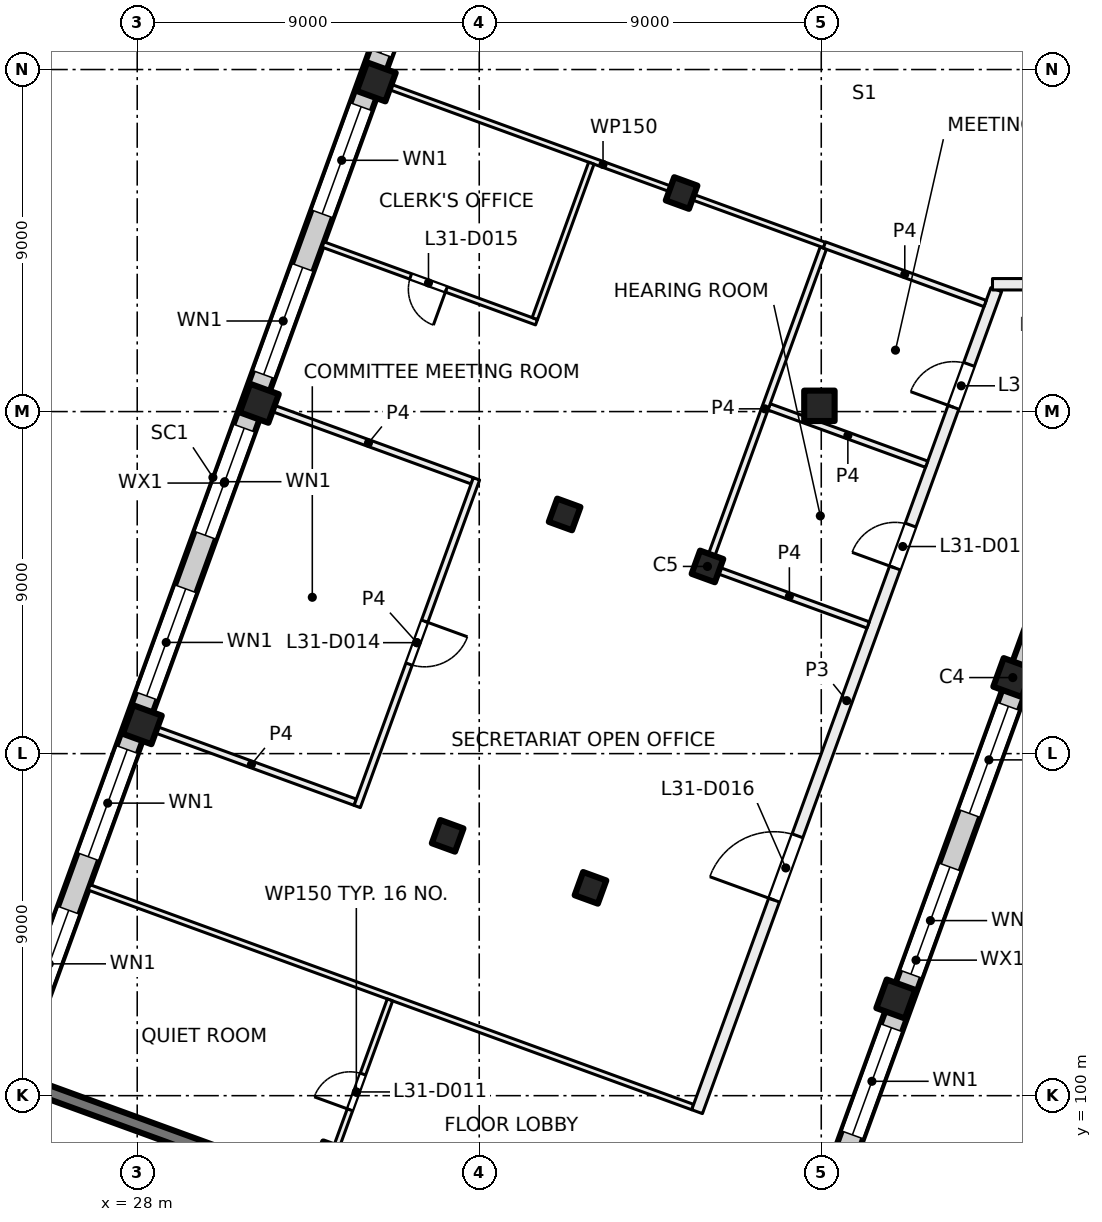
"""IFC4 building model, lengths in metres.
Left out: names, types, materials, properties, quantities, classifications, styles, units other than length and angle.
Written with IfcOpenShell. Run it as: python <this file> out.ifc"""

import sys

from ifc_helpers import new_model, si_unit, direction, frame, frame_2d, origin, origin_2d, place, context, subcontext, project, spatial, rectangle, extrude, element, fill, save


model = new_model("IFC4")
c1 = context("Model", 3, precision=1e-05, world=origin(), true_north=direction((0.0, 1.0)))
c2 = subcontext(c1, "Body", "Model", "MODEL_VIEW")
j1 = project(units=[si_unit("LENGTHUNIT", "METRE"), si_unit("PLANEANGLEUNIT", "RADIAN")], contexts=[c1])
p1 = place(None, origin())
s1 = spatial("IfcSite", under=j1, at=p1, CompositionType="ELEMENT")
p2 = place(p1, origin())
s2 = spatial("IfcBuilding", under=s1, at=p2, CompositionType="ELEMENT")
p3 = place(p2, frame((0.0, 0.0, 134.5)))
s3 = spatial("IfcBuildingStorey", under=s2, at=p3, CompositionType="ELEMENT", Elevation=134.5)
p4 = place(p3, frame((45.952, 118.152, 0.0), z_axis=(0.0, 0.0, 1.0), x_axis=(1.0, 0.0, 0.0)))
e1 = element("IfcColumn", 1, at=p4, inside=s3, PredefinedType="COLUMN", context=c2, shape_type="SweptSolid", body=[
    extrude(rectangle(XDim=0.8, YDim=0.8, at=origin_2d()), origin(), (0.0, 0.0, 1.0), 4.0),
])
for number, where, z_axis, x_axis in (
    (2, (43.006, 113.925, 0.0), (0.0, 0.0, 1.0), (-0.342, -0.94, 0.0)),
    (3, (39.927, 105.468, 0.0), (0.0, 0.0, 1.0), (-0.342, -0.94, 0.0)),
    (4, (42.325, 123.751, 0.0), (0.0, 0.0, 1.0), (-0.342, -0.94, 0.0)),
    (5, (39.247, 115.293, 0.0), (0.0, 0.0, 1.0), (-0.342, -0.94, 0.0)),
    (6, (36.169, 106.836, 0.0), (0.0, 0.0, 1.0), (-0.342, -0.94, 0.0)),
    (7, (33.091, 98.379, 0.0), (0.0, 0.0, 1.0), (-0.342, -0.94, 0.0)),
):
    element("IfcColumn", number, at=place(p3, frame(where, z_axis=z_axis, x_axis=x_axis)), inside=s3, PredefinedType="COLUMN", context=c2, shape_type="SweptSolid", body=[
        extrude(rectangle(XDim=0.65, YDim=0.65, at=origin_2d()), origin(), (0.0, 0.0, 1.0), 4.0),
    ])
for number, where, z_axis, x_axis in (
    (8, (51.04, 111.001, 0.0), (0.0, 0.0, 1.0), (-0.342, -0.94, 0.0)),
    (9, (47.962, 102.544, 0.0), (0.0, 0.0, 1.0), (-0.342, -0.94, 0.0)),
    (10, (34.291, 126.675, 0.0), (0.0, 0.0, 1.0), (-0.342, -0.94, 0.0)),
    (11, (31.212, 118.218, 0.0), (0.0, 0.0, 1.0), (-0.342, -0.94, 0.0)),
    (12, (28.134, 109.76, 0.0), (0.0, 0.0, 1.0), (-0.342, -0.94, 0.0)),
):
    element("IfcColumn", number, at=place(p3, frame(where, z_axis=z_axis, x_axis=x_axis)), inside=s3, PredefinedType="COLUMN", context=c2, shape_type="SweptSolid", body=[
        extrude(rectangle(XDim=0.8, YDim=0.8, at=origin_2d()), origin(), (0.0, 0.0, 1.0), 4.0),
    ])
p5 = place(p3, frame((32.962, 97.441, 0.0), z_axis=(0.0, 0.0, 1.0), x_axis=(-0.939689545667, 0.342028592028, 0.0)))
e13 = element("IfcWall", 13, at=p5, inside=s3, PredefinedType="SHEAR", context=c2, shape_type="SweptSolid", body=[
    extrude(rectangle(XDim=8.65, YDim=0.35, at=frame_2d((4.325, 0.0))), origin(), (0.0, 0.0, 1.0), 4.0),
])
p6 = place(p3, frame((52.212, 113.783, 0.0), z_axis=(0.0, 0.0, 1.0), x_axis=(-0.34202521188, -0.939690775968, 0.0)))
e14 = element("IfcWall", 14, at=p6, inside=s3, PredefinedType="SOLIDWALL", context=c2, shape_type="SweptSolid", body=[
    extrude(rectangle(XDim=21.745, YDim=0.6, at=frame_2d((10.873, 0.0))), origin(), (0.0, 0.0, 1.0), 3.625),
])
p7 = place(p6, frame((3.765, 0.0, 0.9)))
e15 = element("IfcOpeningElement", 15, at=p7, cuts=e14, PredefinedType="OPENING", context=c2, shape_type="SweptSolid", body=[
    extrude(rectangle(XDim=3.0, YDim=2.4, at=frame_2d((1.5, 1.2))), frame((0.0, 0.31, 0.0), z_axis=(0.0, -1.0, 0.0), x_axis=(1.0, 0.0, 0.0)), (0.0, 0.0, 1.0), 0.62),
])
p8 = place(p6, frame((8.265, 0.0, 0.9)))
e16 = element("IfcOpeningElement", 16, at=p8, cuts=e14, PredefinedType="OPENING", context=c2, shape_type="SweptSolid", body=[
    extrude(rectangle(XDim=3.0, YDim=2.4, at=frame_2d((1.5, 1.2))), frame((0.0, 0.31, 0.0), z_axis=(0.0, -1.0, 0.0), x_axis=(1.0, 0.0, 0.0)), (0.0, 0.0, 1.0), 0.62),
])
p9 = place(p6, frame((12.765, 0.0, 0.9)))
e17 = element("IfcOpeningElement", 17, at=p9, cuts=e14, PredefinedType="OPENING", context=c2, shape_type="SweptSolid", body=[
    extrude(rectangle(XDim=3.0, YDim=2.4, at=frame_2d((1.5, 1.2))), frame((0.0, 0.31, 0.0), z_axis=(0.0, -1.0, 0.0), x_axis=(1.0, 0.0, 0.0)), (0.0, 0.0, 1.0), 0.62),
])
p10 = place(p6, frame((17.265, 0.0, 0.9)))
e18 = element("IfcOpeningElement", 18, at=p10, cuts=e14, PredefinedType="OPENING", context=c2, shape_type="SweptSolid", body=[
    extrude(rectangle(XDim=3.0, YDim=2.4, at=frame_2d((1.5, 1.2))), frame((0.0, 0.31, 0.0), z_axis=(0.0, -1.0, 0.0), x_axis=(1.0, 0.0, 0.0)), (0.0, 0.0, 1.0), 0.62),
])
p11 = place(p3, frame((24.666, 100.669, 0.0), z_axis=(0.0, 0.0, 1.0), x_axis=(0.34201964167, 0.939692803373, 0.0)))
e19 = element("IfcWall", 19, at=p11, inside=s3, PredefinedType="SOLIDWALL", context=c2, shape_type="SweptSolid", body=[
    extrude(rectangle(XDim=32.884, YDim=0.6, at=frame_2d((16.442, 0.0))), origin(), (0.0, 0.0, 1.0), 3.625),
])
p12 = place(p11, frame((1.48, 0.0, 0.9)))
e20 = element("IfcOpeningElement", 20, at=p12, cuts=e19, PredefinedType="OPENING", context=c2, shape_type="SweptSolid", body=[
    extrude(rectangle(XDim=3.0, YDim=2.4, at=frame_2d((1.5, 1.2))), frame((0.0, 0.31, 0.0), z_axis=(0.0, -1.0, 0.0), x_axis=(1.0, 0.0, 0.0)), (0.0, 0.0, 1.0), 0.62),
])
p13 = place(p11, frame((5.98, 0.0, 0.9)))
e21 = element("IfcOpeningElement", 21, at=p13, cuts=e19, PredefinedType="OPENING", context=c2, shape_type="SweptSolid", body=[
    extrude(rectangle(XDim=3.0, YDim=2.4, at=frame_2d((1.5, 1.2))), frame((0.0, 0.31, 0.0), z_axis=(0.0, -1.0, 0.0), x_axis=(1.0, 0.0, 0.0)), (0.0, 0.0, 1.0), 0.62),
])
p14 = place(p11, frame((10.48, 0.0, 0.9)))
e22 = element("IfcOpeningElement", 22, at=p14, cuts=e19, PredefinedType="OPENING", context=c2, shape_type="SweptSolid", body=[
    extrude(rectangle(XDim=3.0, YDim=2.4, at=frame_2d((1.5, 1.2))), frame((0.0, 0.31, 0.0), z_axis=(0.0, -1.0, 0.0), x_axis=(1.0, 0.0, 0.0)), (0.0, 0.0, 1.0), 0.62),
])
p15 = place(p11, frame((14.98, 0.0, 0.9)))
e23 = element("IfcOpeningElement", 23, at=p15, cuts=e19, PredefinedType="OPENING", context=c2, shape_type="SweptSolid", body=[
    extrude(rectangle(XDim=3.0, YDim=2.4, at=frame_2d((1.5, 1.2))), frame((0.0, 0.31, 0.0), z_axis=(0.0, -1.0, 0.0), x_axis=(1.0, 0.0, 0.0)), (0.0, 0.0, 1.0), 0.62),
])
p16 = place(p11, frame((19.48, 0.0, 0.9)))
e24 = element("IfcOpeningElement", 24, at=p16, cuts=e19, PredefinedType="OPENING", context=c2, shape_type="SweptSolid", body=[
    extrude(rectangle(XDim=3.0, YDim=2.4, at=frame_2d((1.5, 1.2))), frame((0.0, 0.31, 0.0), z_axis=(0.0, -1.0, 0.0), x_axis=(1.0, 0.0, 0.0)), (0.0, 0.0, 1.0), 0.62),
])
p17 = place(p11, frame((23.98, 0.0, 0.9)))
e25 = element("IfcOpeningElement", 25, at=p17, cuts=e19, PredefinedType="OPENING", context=c2, shape_type="SweptSolid", body=[
    extrude(rectangle(XDim=3.0, YDim=2.4, at=frame_2d((1.5, 1.2))), frame((0.0, 0.31, 0.0), z_axis=(0.0, -1.0, 0.0), x_axis=(1.0, 0.0, 0.0)), (0.0, 0.0, 1.0), 0.62),
])
p18 = place(p11, frame((28.48, 0.0, 0.9)))
e26 = element("IfcOpeningElement", 26, at=p18, cuts=e19, PredefinedType="OPENING", context=c2, shape_type="SweptSolid", body=[
    extrude(rectangle(XDim=3.0, YDim=2.4, at=frame_2d((1.5, 1.2))), frame((0.0, 0.31, 0.0), z_axis=(0.0, -1.0, 0.0), x_axis=(1.0, 0.0, 0.0)), (0.0, 0.0, 1.0), 0.62),
])
p19 = place(p3, frame((26.736, 105.48, 0.0), z_axis=(0.0, 0.0, 1.0), x_axis=(0.939695108427, -0.342013308511, 0.0)))
e27 = element("IfcWall", 27, at=p19, inside=s3, PredefinedType="PARTITIONING", context=c2, shape_type="SweptSolid", body=[
    extrude(rectangle(XDim=16.9, YDim=0.15, at=frame_2d((8.45, 0.0))), origin(), (0.0, 0.0, 1.0), 3.625),
])
p20 = place(p3, frame((31.353, 118.166, 0.0), z_axis=(0.0, 0.0, 1.0), x_axis=(0.939708789041, -0.341975718143, 0.0)))
e28 = element("IfcWall", 28, at=p20, inside=s3, PredefinedType="PARTITIONING", context=c2, shape_type="SweptSolid", body=[
    extrude(rectangle(XDim=5.813, YDim=0.175, at=frame_2d((2.907, 0.0))), origin(), (0.0, 0.0, 1.0), 3.625),
])
p21 = place(p3, frame((33.737, 107.721, 0.0), z_axis=(0.0, 0.0, 1.0), x_axis=(-0.939694052357, 0.34201621009, 0.0)))
e29 = element("IfcWall", 29, at=p21, inside=s3, PredefinedType="PARTITIONING", context=c2, shape_type="SweptSolid", body=[
    extrude(rectangle(XDim=5.813, YDim=0.175, at=frame_2d((2.906, 0.0))), origin(), (0.0, 0.0, 1.0), 3.625),
])
p22 = place(p3, frame((34.431, 126.624, 0.0), z_axis=(0.0, 0.0, 1.0), x_axis=(0.939703144457, -0.341991228392, 0.0)))
e30 = element("IfcWall", 30, at=p22, inside=s3, PredefinedType="PARTITIONING", context=c2, shape_type="SweptSolid", body=[
    extrude(rectangle(XDim=12.401, YDim=0.15, at=frame_2d((6.2, 0.0))), origin(), (0.0, 0.0, 1.0), 3.625),
])
p23 = place(p3, frame((32.881, 97.657, 0.0), z_axis=(0.0, 0.0, 1.0), x_axis=(0.341981688871, 0.939706616172, 0.0)))
e31 = element("IfcWall", 31, at=p23, inside=s3, PredefinedType="PARTITIONING", context=c2, shape_type="SweptSolid", body=[
    extrude(rectangle(XDim=5.175, YDim=0.15, at=frame_2d((2.587, 0.0))), origin(), (0.0, 0.0, 1.0), 3.625),
])
p24 = place(p23, frame((2.098, 0.0, 0.0)))
e32 = element("IfcOpeningElement", 32, at=p24, cuts=e31, PredefinedType="OPENING", context=c2, shape_type="SweptSolid", body=[
    extrude(rectangle(XDim=1.0, YDim=2.1, at=frame_2d((0.5, 1.05))), frame((0.0, 0.085, 0.0), z_axis=(0.0, -1.0, 0.0), x_axis=(1.0, 0.0, 0.0)), (0.0, 0.0, 1.0), 0.17),
])
p25 = place(p3, frame((36.928, 116.23, 0.0), z_axis=(0.0, 0.0, 1.0), x_axis=(-0.342125481497, -0.93965427414, 0.0)))
e33 = element("IfcWall", 33, at=p25, inside=s3, PredefinedType="PARTITIONING", context=c2, shape_type="SweptSolid", body=[
    extrude(rectangle(XDim=9.175, YDim=0.175, at=frame_2d((4.587, 0.0))), origin(), (0.0, 0.0, 1.0), 3.625),
])
p26 = place(p25, frame((3.987, 0.0, 0.0)))
e34 = element("IfcOpeningElement", 34, at=p26, cuts=e33, PredefinedType="OPENING", context=c2, shape_type="SweptSolid", body=[
    extrude(rectangle(XDim=1.2, YDim=2.1, at=frame_2d((0.6, 1.05))), frame((0.0, 0.097, 0.0), z_axis=(0.0, -1.0, 0.0), x_axis=(1.0, 0.0, 0.0)), (0.0, 0.0, 1.0), 0.195),
])
p27 = place(p3, frame((38.507, 120.351, 0.0), z_axis=(0.0, 0.0, 1.0), x_axis=(-0.939678850769, 0.342057973766, 0.0)))
e35 = element("IfcWall", 35, at=p27, inside=s3, PredefinedType="PARTITIONING", context=c2, shape_type="SweptSolid", body=[
    extrude(rectangle(XDim=5.975, YDim=0.15, at=frame_2d((2.988, 0.0))), origin(), (0.0, 0.0, 1.0), 3.625),
])
p28 = place(p27, frame((2.525, 0.0, 0.0)))
e36 = element("IfcOpeningElement", 36, at=p28, cuts=e35, PredefinedType="OPENING", context=c2, shape_type="SweptSolid", body=[
    extrude(rectangle(XDim=1.0, YDim=2.1, at=frame_2d((0.5, 1.05))), frame((0.0, 0.085, 0.0), z_axis=(0.0, -1.0, 0.0), x_axis=(1.0, 0.0, 0.0)), (0.0, 0.0, 1.0), 0.17),
])
p29 = place(p3, frame((39.95, 124.536, 0.0), z_axis=(0.0, 0.0, 1.0), x_axis=(-0.341783611499, -0.939778677621, 0.0)))
e37 = element("IfcWall", 37, at=p29, inside=s3, PredefinedType="PARTITIONING", context=c2, shape_type="SweptSolid", body=[
    extrude(rectangle(XDim=4.351, YDim=0.15, at=frame_2d((2.175, 0.0))), origin(), (0.0, 0.0, 1.0), 3.625),
])
p30 = place(p3, frame((42.732, 99.579, 0.0), z_axis=(0.0, 0.0, 1.0), x_axis=(0.342036000593, 0.939686849061, 0.0)))
e38 = element("IfcWall", 38, at=p30, inside=s3, PredefinedType="PARTITIONING", context=c2, shape_type="SweptSolid", body=[
    extrude(rectangle(XDim=23.018, YDim=0.3, at=frame_2d((11.509, 0.0))), origin(), (0.0, 0.0, 1.0), 3.625),
])
p31 = place(p30, frame((15.225, 0.0, 0.0)))
e39 = element("IfcOpeningElement", 39, at=p31, cuts=e38, PredefinedType="OPENING", context=c2, shape_type="SweptSolid", body=[
    extrude(rectangle(XDim=1.2, YDim=2.1, at=frame_2d((0.6, 1.05))), frame((0.0, 0.16, 0.0), z_axis=(0.0, -1.0, 0.0), x_axis=(1.0, 0.0, 0.0)), (0.0, 0.0, 1.0), 0.32),
])
p32 = place(p30, frame((19.725, 0.0, 0.0)))
e40 = element("IfcOpeningElement", 40, at=p32, cuts=e38, PredefinedType="OPENING", context=c2, shape_type="SweptSolid", body=[
    extrude(rectangle(XDim=1.2, YDim=2.1, at=frame_2d((0.6, 1.05))), frame((0.0, 0.16, 0.0), z_axis=(0.0, -1.0, 0.0), x_axis=(1.0, 0.0, 0.0)), (0.0, 0.0, 1.0), 0.32),
])
p33 = place(p30, frame((5.925, 0.0, 0.0)))
e41 = element("IfcOpeningElement", 41, at=p33, cuts=e38, PredefinedType="OPENING", context=c2, shape_type="SweptSolid", body=[
    extrude(rectangle(XDim=1.8, YDim=2.1, at=frame_2d((0.9, 1.05))), frame((0.0, 0.16, 0.0), z_axis=(0.0, -1.0, 0.0), x_axis=(1.0, 0.0, 0.0)), (0.0, 0.0, 1.0), 0.32),
])
for number, where, z_axis, x_axis in (
    (42, (43.088, 113.895, 0.0), (0.0, 0.0, 1.0), (0.94, -0.342, 0.0)),
    (43, (44.627, 118.124, 0.0), (0.0, 0.0, 1.0), (0.94, -0.342, 0.0)),
):
    element("IfcWall", number, at=place(p3, frame(where, z_axis=z_axis, x_axis=x_axis)), inside=s3, PredefinedType="PARTITIONING", context=c2, shape_type="SweptSolid", body=[
        extrude(rectangle(XDim=4.412, YDim=0.175, at=frame_2d((2.206, 0.0))), origin(), (0.0, 0.0, 1.0), 3.625),
    ])
p34 = place(p3, frame((46.054, 122.301, 0.0), z_axis=(0.0, 0.0, 1.0), x_axis=(-0.341963022424, -0.939713409128, 0.0)))
e44 = element("IfcWall", 44, at=p34, inside=s3, PredefinedType="PARTITIONING", context=c2, shape_type="SweptSolid", body=[
    extrude(rectangle(XDim=9.001, YDim=0.175, at=frame_2d((4.5, 0.0))), origin(), (0.0, 0.0, 1.0), 3.625),
])
p35 = place(p3, frame((50.312, 120.843, 0.0), z_axis=(0.0, 0.0, 1.0), x_axis=(-0.939609529273, 0.342248349154, 0.0)))
e45 = element("IfcWall", 45, at=p35, inside=s3, PredefinedType="PARTITIONING", context=c2, shape_type="SweptSolid", body=[
    extrude(rectangle(XDim=4.5, YDim=0.175, at=frame_2d((2.25, 0.0))), origin(), (0.0, 0.0, 1.0), 3.625),
])
p36 = place(p3, frame((50.506, 121.35, 0.0), z_axis=(0.0, 0.0, 1.0), x_axis=(1.0, 0.0, 0.0)))
e46 = element("IfcWall", 46, at=p36, inside=s3, PredefinedType="PARTITIONING", context=c2, shape_type="SweptSolid", body=[
    extrude(rectangle(XDim=35.306, YDim=0.3, at=frame_2d((17.653, 0.0))), origin(), (0.0, 0.0, 1.0), 3.625),
])
p37 = place(p36, frame((30.244, 0.0, 0.0)))
e47 = element("IfcOpeningElement", 47, at=p37, cuts=e46, PredefinedType="OPENING", context=c2, shape_type="SweptSolid", body=[
    extrude(rectangle(XDim=1.0, YDim=2.1, at=frame_2d((0.5, 1.05))), frame((0.0, 0.16, 0.0), z_axis=(0.0, -1.0, 0.0), x_axis=(1.0, 0.0, 0.0)), (0.0, 0.0, 1.0), 0.32),
])
p38 = place(p36, frame((14.094, 0.0, 0.0)))
e48 = element("IfcOpeningElement", 48, at=p38, cuts=e46, PredefinedType="OPENING", context=c2, shape_type="SweptSolid", body=[
    extrude(rectangle(XDim=1.8, YDim=2.1, at=frame_2d((0.9, 1.05))), frame((0.0, 0.16, 0.0), z_axis=(0.0, -1.0, 0.0), x_axis=(1.0, 0.0, 0.0)), (0.0, 0.0, 1.0), 0.32),
])
p39 = place(p36, frame((1.047, 0.0, 0.0)))
e49 = element("IfcOpeningElement", 49, at=p39, cuts=e46, PredefinedType="OPENING", context=c2, shape_type="SweptSolid", body=[
    extrude(rectangle(XDim=1.8, YDim=2.1, at=frame_2d((0.9, 1.05))), frame((0.0, 0.16, 0.0), z_axis=(0.0, -1.0, 0.0), x_axis=(1.0, 0.0, 0.0)), (0.0, 0.0, 1.0), 0.32),
])
p40 = place(p7, origin())
e50 = element("IfcWindow", 50, at=p40, inside=s3, PartitioningType="SINGLE_PANEL", PredefinedType="WINDOW", context=c2, shape_type="SweptSolid", body=[
    extrude(rectangle(XDim=3.0, YDim=2.4, at=frame_2d((1.5, 1.2))), frame((0.0, 0.03, 0.0), z_axis=(0.0, -1.0, 0.0), x_axis=(1.0, 0.0, 0.0)), (0.0, 0.0, 1.0), 0.06),
])
fill(e15, e50)
p41 = place(p8, origin())
e51 = element("IfcWindow", 51, at=p41, inside=s3, PartitioningType="SINGLE_PANEL", PredefinedType="WINDOW", context=c2, shape_type="SweptSolid", body=[
    extrude(rectangle(XDim=3.0, YDim=2.4, at=frame_2d((1.5, 1.2))), frame((0.0, 0.03, 0.0), z_axis=(0.0, -1.0, 0.0), x_axis=(1.0, 0.0, 0.0)), (0.0, 0.0, 1.0), 0.06),
])
fill(e16, e51)
p42 = place(p9, origin())
e52 = element("IfcWindow", 52, at=p42, inside=s3, PartitioningType="SINGLE_PANEL", PredefinedType="WINDOW", context=c2, shape_type="SweptSolid", body=[
    extrude(rectangle(XDim=3.0, YDim=2.4, at=frame_2d((1.5, 1.2))), frame((0.0, 0.03, 0.0), z_axis=(0.0, -1.0, 0.0), x_axis=(1.0, 0.0, 0.0)), (0.0, 0.0, 1.0), 0.06),
])
fill(e17, e52)
p43 = place(p12, origin())
e53 = element("IfcWindow", 53, at=p43, inside=s3, PartitioningType="SINGLE_PANEL", PredefinedType="WINDOW", context=c2, shape_type="SweptSolid", body=[
    extrude(rectangle(XDim=3.0, YDim=2.4, at=frame_2d((1.5, 1.2))), frame((0.0, 0.03, 0.0), z_axis=(0.0, -1.0, 0.0), x_axis=(1.0, 0.0, 0.0)), (0.0, 0.0, 1.0), 0.06),
])
fill(e20, e53)
p44 = place(p13, origin())
e54 = element("IfcWindow", 54, at=p44, inside=s3, PartitioningType="SINGLE_PANEL", PredefinedType="WINDOW", context=c2, shape_type="SweptSolid", body=[
    extrude(rectangle(XDim=3.0, YDim=2.4, at=frame_2d((1.5, 1.2))), frame((0.0, 0.03, 0.0), z_axis=(0.0, -1.0, 0.0), x_axis=(1.0, 0.0, 0.0)), (0.0, 0.0, 1.0), 0.06),
])
fill(e21, e54)
p45 = place(p14, origin())
e55 = element("IfcWindow", 55, at=p45, inside=s3, PartitioningType="SINGLE_PANEL", PredefinedType="WINDOW", context=c2, shape_type="SweptSolid", body=[
    extrude(rectangle(XDim=3.0, YDim=2.4, at=frame_2d((1.5, 1.2))), frame((0.0, 0.03, 0.0), z_axis=(0.0, -1.0, 0.0), x_axis=(1.0, 0.0, 0.0)), (0.0, 0.0, 1.0), 0.06),
])
fill(e22, e55)
p46 = place(p15, origin())
e56 = element("IfcWindow", 56, at=p46, inside=s3, PartitioningType="SINGLE_PANEL", PredefinedType="WINDOW", context=c2, shape_type="SweptSolid", body=[
    extrude(rectangle(XDim=3.0, YDim=2.4, at=frame_2d((1.5, 1.2))), frame((0.0, 0.03, 0.0), z_axis=(0.0, -1.0, 0.0), x_axis=(1.0, 0.0, 0.0)), (0.0, 0.0, 1.0), 0.06),
])
fill(e23, e56)
p47 = place(p16, origin())
e57 = element("IfcWindow", 57, at=p47, inside=s3, PartitioningType="SINGLE_PANEL", PredefinedType="WINDOW", context=c2, shape_type="SweptSolid", body=[
    extrude(rectangle(XDim=3.0, YDim=2.4, at=frame_2d((1.5, 1.2))), frame((0.0, 0.03, 0.0), z_axis=(0.0, -1.0, 0.0), x_axis=(1.0, 0.0, 0.0)), (0.0, 0.0, 1.0), 0.06),
])
fill(e24, e57)
p48 = place(p17, origin())
e58 = element("IfcWindow", 58, at=p48, inside=s3, PartitioningType="SINGLE_PANEL", PredefinedType="WINDOW", context=c2, shape_type="SweptSolid", body=[
    extrude(rectangle(XDim=3.0, YDim=2.4, at=frame_2d((1.5, 1.2))), frame((0.0, 0.03, 0.0), z_axis=(0.0, -1.0, 0.0), x_axis=(1.0, 0.0, 0.0)), (0.0, 0.0, 1.0), 0.06),
])
fill(e25, e58)
p49 = place(p18, origin())
e59 = element("IfcWindow", 59, at=p49, inside=s3, PartitioningType="SINGLE_PANEL", PredefinedType="WINDOW", context=c2, shape_type="SweptSolid", body=[
    extrude(rectangle(XDim=3.0, YDim=2.4, at=frame_2d((1.5, 1.2))), frame((0.0, 0.03, 0.0), z_axis=(0.0, -1.0, 0.0), x_axis=(1.0, 0.0, 0.0)), (0.0, 0.0, 1.0), 0.06),
])
fill(e26, e59)
p50 = place(p24, origin())
e60 = element("IfcDoor", 60, at=p50, inside=s3, OperationType="SINGLE_SWING_LEFT", PredefinedType="DOOR", context=c2, shape_type="SweptSolid", body=[
    extrude(rectangle(XDim=1.0, YDim=2.1, at=frame_2d((0.5, 1.05))), frame((0.0, 0.025, 0.0), z_axis=(0.0, -1.0, 0.0), x_axis=(1.0, 0.0, 0.0)), (0.0, 0.0, 1.0), 0.05),
])
fill(e32, e60)
p51 = place(p31, origin())
e61 = element("IfcDoor", 61, at=p51, inside=s3, OperationType="DOUBLE_DOOR_SINGLE_SWING", PredefinedType="DOOR", context=c2, shape_type="SweptSolid", body=[
    extrude(rectangle(XDim=1.2, YDim=2.1, at=frame_2d((0.6, 1.05))), frame((0.0, 0.025, 0.0), z_axis=(0.0, -1.0, 0.0), x_axis=(1.0, 0.0, 0.0)), (0.0, 0.0, 1.0), 0.05),
])
fill(e39, e61)
p52 = place(p32, origin())
e62 = element("IfcDoor", 62, at=p52, inside=s3, OperationType="DOUBLE_DOOR_SINGLE_SWING", PredefinedType="DOOR", context=c2, shape_type="SweptSolid", body=[
    extrude(rectangle(XDim=1.2, YDim=2.1, at=frame_2d((0.6, 1.05))), frame((0.0, 0.025, 0.0), z_axis=(0.0, -1.0, 0.0), x_axis=(1.0, 0.0, 0.0)), (0.0, 0.0, 1.0), 0.05),
])
fill(e40, e62)
p53 = place(p26, origin())
e63 = element("IfcDoor", 63, at=p53, inside=s3, OperationType="DOUBLE_DOOR_SINGLE_SWING", PredefinedType="DOOR", context=c2, shape_type="SweptSolid", body=[
    extrude(rectangle(XDim=1.2, YDim=2.1, at=frame_2d((0.6, 1.05))), frame((0.0, 0.025, 0.0), z_axis=(0.0, -1.0, 0.0), x_axis=(1.0, 0.0, 0.0)), (0.0, 0.0, 1.0), 0.05),
])
fill(e34, e63)
p54 = place(p28, origin())
e64 = element("IfcDoor", 64, at=p54, inside=s3, OperationType="SINGLE_SWING_LEFT", PredefinedType="DOOR", context=c2, shape_type="SweptSolid", body=[
    extrude(rectangle(XDim=1.0, YDim=2.1, at=frame_2d((0.5, 1.05))), frame((0.0, 0.025, 0.0), z_axis=(0.0, -1.0, 0.0), x_axis=(1.0, 0.0, 0.0)), (0.0, 0.0, 1.0), 0.05),
])
fill(e36, e64)
p55 = place(p33, origin())
e65 = element("IfcDoor", 65, at=p55, inside=s3, OperationType="DOUBLE_DOOR_SINGLE_SWING", PredefinedType="DOOR", context=c2, shape_type="SweptSolid", body=[
    extrude(rectangle(XDim=1.8, YDim=2.1, at=frame_2d((0.9, 1.05))), frame((0.0, 0.025, 0.0), z_axis=(0.0, -1.0, 0.0), x_axis=(1.0, 0.0, 0.0)), (0.0, 0.0, 1.0), 0.05),
])
fill(e41, e65)
save(model, sys.argv[1])
